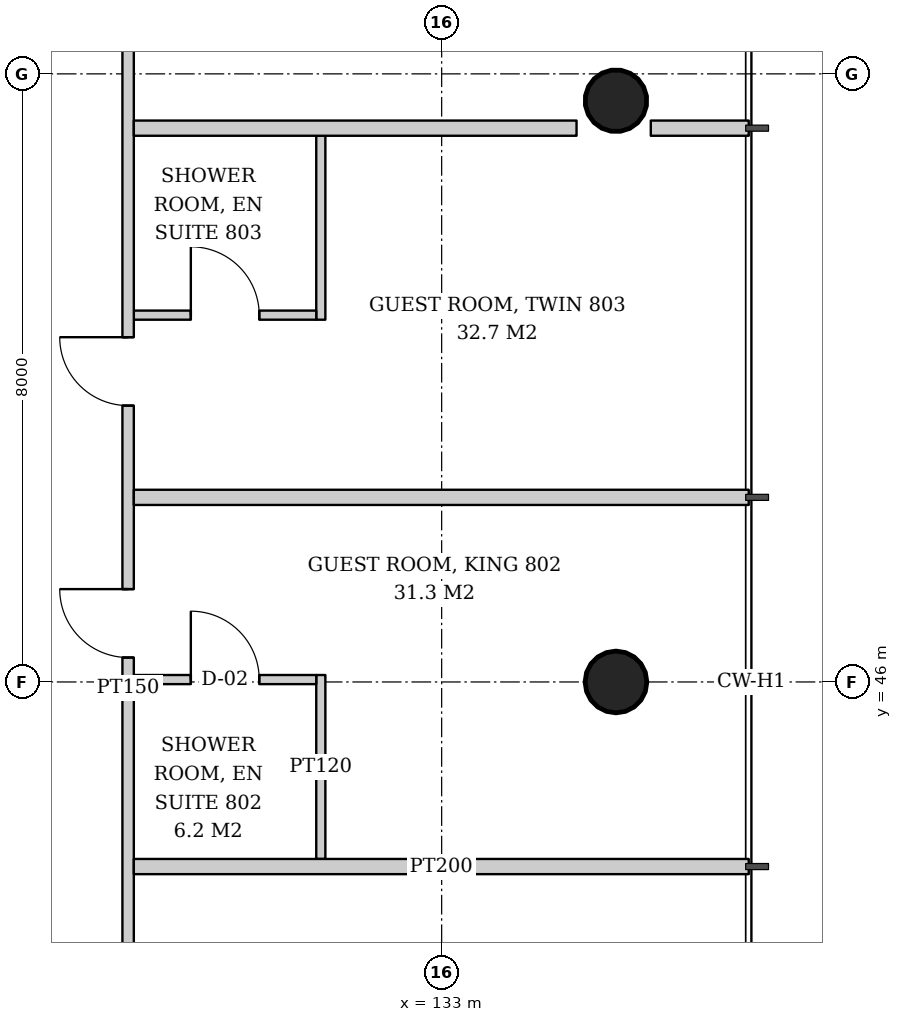
"""IFC4 building model, lengths in metres.
Left out: names, types, materials, properties, quantities, classifications, styles, units other than length and angle.
Written with IfcOpenShell. Run it as: python <this file> out.ifc"""

import sys

from ifc_helpers import new_model, si_unit, direction, frame, frame_2d, origin, origin_2d, place, context, subcontext, project, spatial, rectangle, hollow_circle, extrude, element, fill, save


model = new_model("IFC4")
c1 = context("Model", 3, precision=1e-05, world=origin(), true_north=direction((0.0, 1.0)))
c2 = subcontext(c1, "Body", "Model", "MODEL_VIEW")
j1 = project(units=[si_unit("LENGTHUNIT", "METRE"), si_unit("PLANEANGLEUNIT", "RADIAN")], contexts=[c1])
p1 = place(None, origin())
s1 = spatial("IfcSite", under=j1, at=p1, CompositionType="ELEMENT")
p2 = place(p1, origin())
s2 = spatial("IfcBuilding", under=s1, at=p2, CompositionType="ELEMENT")
p3 = place(p2, frame((0.0, 0.0, 36.2)))
s3 = spatial("IfcBuildingStorey", under=s2, at=p3, CompositionType="ELEMENT", Elevation=36.2)
p4 = place(p3, frame((135.345, 46.0, 0.0), z_axis=(-0.043005470007, 0.0, 0.999074836811), x_axis=(0.0, -1.0, 0.0)))
e1 = element("IfcColumn", 1, at=p4, inside=s3, PredefinedType="COLUMN", context=c2, shape_type="SweptSolid", body=[
    extrude(hollow_circle(Radius=0.406, WallThickness=0.03, at=origin_2d()), origin(), (0.0, 0.0, 1.0), 3.803),
])
p5 = place(p3, frame((135.345, 53.672, 0.0), z_axis=(-0.042995531285, -0.021497765643, 0.998843946952), x_axis=(0.4472135955, -0.894427191, 0.0)))
e2 = element("IfcColumn", 2, at=p5, inside=s3, PredefinedType="COLUMN", context=c2, shape_type="SweptSolid", body=[
    extrude(hollow_circle(Radius=0.406, WallThickness=0.03, at=origin_2d()), origin(), (0.0, 0.0, 1.0), 3.804),
])
p6 = place(p3, frame((131.41, 43.671, 0.0), z_axis=(0.0, 0.0, 1.0), x_axis=(0.0, 1.0, 0.0)))
e3 = element("IfcWall", 3, at=p6, inside=s3, PredefinedType="PARTITIONING", context=c2, shape_type="SweptSolid", body=[
    extrude(rectangle(XDim=2.42, YDim=0.12, at=frame_2d((1.21, 0.0))), origin(), (0.0, 0.0, 1.0), 2.847),
])
p7 = place(p3, frame((128.95, 46.031, 0.0), z_axis=(0.0, 0.0, 1.0), x_axis=(1.0, 0.0, 0.0)))
e4 = element("IfcWall", 4, at=p7, inside=s3, PredefinedType="PARTITIONING", context=c2, shape_type="SweptSolid", body=[
    extrude(rectangle(XDim=2.4, YDim=0.12, at=frame_2d((1.2, 0.0))), origin(), (0.0, 0.0, 1.0), 3.6),
])
p8 = place(p7, frame((0.75, 0.0, 0.0)))
e5 = element("IfcOpeningElement", 5, at=p8, cuts=e4, PredefinedType="OPENING", context=c2, shape_type="SweptSolid", body=[
    extrude(rectangle(XDim=0.9, YDim=2.1, at=frame_2d((0.45, 1.05))), frame((0.0, 0.07, 0.0), z_axis=(0.0, -1.0, 0.0), x_axis=(1.0, 0.0, 0.0)), (0.0, 0.0, 1.0), 0.14),
])
p9 = place(p3, frame((131.41, 50.766, 0.0), z_axis=(0.0, 0.0, 1.0), x_axis=(0.0, 1.0, 0.0)))
e6 = element("IfcWall", 6, at=p9, inside=s3, PredefinedType="PARTITIONING", context=c2, shape_type="SweptSolid", body=[
    extrude(rectangle(XDim=2.42, YDim=0.12, at=frame_2d((1.21, 0.0))), origin(), (0.0, 0.0, 1.0), 2.847),
])
p10 = place(p3, frame((128.95, 50.826, 0.0), z_axis=(0.0, 0.0, 1.0), x_axis=(1.0, 0.0, 0.0)))
e7 = element("IfcWall", 7, at=p10, inside=s3, PredefinedType="PARTITIONING", context=c2, shape_type="SweptSolid", body=[
    extrude(rectangle(XDim=2.4, YDim=0.12, at=frame_2d((1.2, 0.0))), origin(), (0.0, 0.0, 1.0), 3.6),
])
p11 = place(p10, frame((0.75, 0.0, 0.0)))
e8 = element("IfcOpeningElement", 8, at=p11, cuts=e7, PredefinedType="OPENING", context=c2, shape_type="SweptSolid", body=[
    extrude(rectangle(XDim=0.9, YDim=2.1, at=frame_2d((0.45, 1.05))), frame((0.0, 0.07, 0.0), z_axis=(0.0, -1.0, 0.0), x_axis=(1.0, 0.0, 0.0)), (0.0, 0.0, 1.0), 0.14),
])
p12 = place(p3, frame((128.875, 34.05, 0.0), z_axis=(0.0, 0.0, 1.0), x_axis=(0.0, 1.0, 0.0)))
e9 = element("IfcWall", 9, at=p12, inside=s3, PredefinedType="PARTITIONING", context=c2, shape_type="SweptSolid", body=[
    extrude(rectangle(XDim=23.75, YDim=0.15, at=frame_2d((11.875, 0.0))), origin(), (0.0, 0.0, 1.0), 2.8),
])
p13 = place(p12, frame((1.907, 0.0, 0.0)))
e10 = element("IfcOpeningElement", 10, at=p13, cuts=e9, PredefinedType="OPENING", context=c2, shape_type="SweptSolid", body=[
    extrude(rectangle(XDim=0.9, YDim=2.1, at=frame_2d((0.45, 1.05))), frame((0.0, 0.085, 0.0), z_axis=(0.0, -1.0, 0.0), x_axis=(1.0, 0.0, 0.0)), (0.0, 0.0, 1.0), 0.17),
])
p14 = place(p12, frame((12.271, 0.0, 0.0)))
e11 = element("IfcOpeningElement", 11, at=p14, cuts=e9, PredefinedType="OPENING", context=c2, shape_type="SweptSolid", body=[
    extrude(rectangle(XDim=0.9, YDim=2.1, at=frame_2d((0.45, 1.05))), frame((0.0, 0.085, 0.0), z_axis=(0.0, -1.0, 0.0), x_axis=(1.0, 0.0, 0.0)), (0.0, 0.0, 1.0), 0.17),
])
p15 = place(p12, frame((15.586, 0.0, 0.0)))
e12 = element("IfcOpeningElement", 12, at=p15, cuts=e9, PredefinedType="OPENING", context=c2, shape_type="SweptSolid", body=[
    extrude(rectangle(XDim=0.9, YDim=2.1, at=frame_2d((0.45, 1.05))), frame((0.0, 0.085, 0.0), z_axis=(0.0, -1.0, 0.0), x_axis=(1.0, 0.0, 0.0)), (0.0, 0.0, 1.0), 0.17),
])
p16 = place(p3, frame((128.95, 43.572, 0.0), z_axis=(0.0, 0.0, 1.0), x_axis=(1.0, 0.0, 0.0)))
e13 = element("IfcWall", 13, at=p16, inside=s3, PredefinedType="PARTITIONING", context=c2, shape_type="SweptSolid", body=[
    extrude(rectangle(XDim=8.09, YDim=0.2, at=frame_2d((4.045, 0.0))), origin(), (0.0, 0.0, 1.0), 3.05),
])
p17 = place(p3, frame((128.95, 48.428, 0.0), z_axis=(0.0, 0.0, 1.0), x_axis=(1.0, 0.0, 0.0)))
e14 = element("IfcWall", 14, at=p17, inside=s3, PredefinedType="PARTITIONING", context=c2, shape_type="SweptSolid", body=[
    extrude(rectangle(XDim=8.09, YDim=0.2, at=frame_2d((4.045, 0.0))), origin(), (0.0, 0.0, 1.0), 2.847),
])
p18 = place(p3, frame((128.95, 53.286, 0.0), z_axis=(0.0, 0.0, 1.0), x_axis=(1.0, 0.0, 0.0)))
e15 = element("IfcWall", 15, at=p18, inside=s3, PredefinedType="PARTITIONING", context=c2, shape_type="SweptSolid", body=[
    extrude(rectangle(XDim=5.824, YDim=0.2, at=frame_2d((2.912, 0.0))), origin(), (0.0, 0.0, 1.0), 3.6),
])
p19 = place(p3, frame((135.751, 53.286, 0.0), z_axis=(0.0, 0.0, 1.0), x_axis=(1.0, 0.0, 0.0)))
e16 = element("IfcWall", 16, at=p19, inside=s3, PredefinedType="PARTITIONING", context=c2, shape_type="SweptSolid", body=[
    extrude(rectangle(XDim=1.289, YDim=0.2, at=frame_2d((0.645, 0.0))), origin(), (0.0, 0.0, 1.0), 3.6),
])
p20 = place(p8, origin())
e17 = element("IfcDoor", 17, at=p20, inside=s3, OperationType="SINGLE_SWING_LEFT", PredefinedType="DOOR", context=c2, shape_type="SweptSolid", body=[
    extrude(rectangle(XDim=0.9, YDim=2.1, at=frame_2d((0.45, 1.05))), frame((0.0, 0.025, 0.0), z_axis=(0.0, -1.0, 0.0), x_axis=(1.0, 0.0, 0.0)), (0.0, 0.0, 1.0), 0.05),
])
fill(e5, e17)
p21 = place(p11, origin())
e18 = element("IfcDoor", 18, at=p21, inside=s3, OperationType="SINGLE_SWING_LEFT", PredefinedType="DOOR", context=c2, shape_type="SweptSolid", body=[
    extrude(rectangle(XDim=0.9, YDim=2.1, at=frame_2d((0.45, 1.05))), frame((0.0, 0.025, 0.0), z_axis=(0.0, -1.0, 0.0), x_axis=(1.0, 0.0, 0.0)), (0.0, 0.0, 1.0), 0.05),
])
fill(e8, e18)
p22 = place(p14, origin())
e19 = element("IfcDoor", 19, at=p22, inside=s3, OperationType="SINGLE_SWING_RIGHT", PredefinedType="DOOR", context=c2, shape_type="SweptSolid", body=[
    extrude(rectangle(XDim=0.9, YDim=2.1, at=frame_2d((0.45, 1.05))), frame((0.0, 0.025, 0.0), z_axis=(0.0, -1.0, 0.0), x_axis=(1.0, 0.0, 0.0)), (0.0, 0.0, 1.0), 0.05),
])
fill(e11, e19)
p23 = place(p15, origin())
e20 = element("IfcDoor", 20, at=p23, inside=s3, OperationType="SINGLE_SWING_RIGHT", PredefinedType="DOOR", context=c2, shape_type="SweptSolid", body=[
    extrude(rectangle(XDim=0.9, YDim=2.1, at=frame_2d((0.45, 1.05))), frame((0.0, 0.025, 0.0), z_axis=(0.0, -1.0, 0.0), x_axis=(1.0, 0.0, 0.0)), (0.0, 0.0, 1.0), 0.05),
])
fill(e12, e20)
save(model, sys.argv[1])
